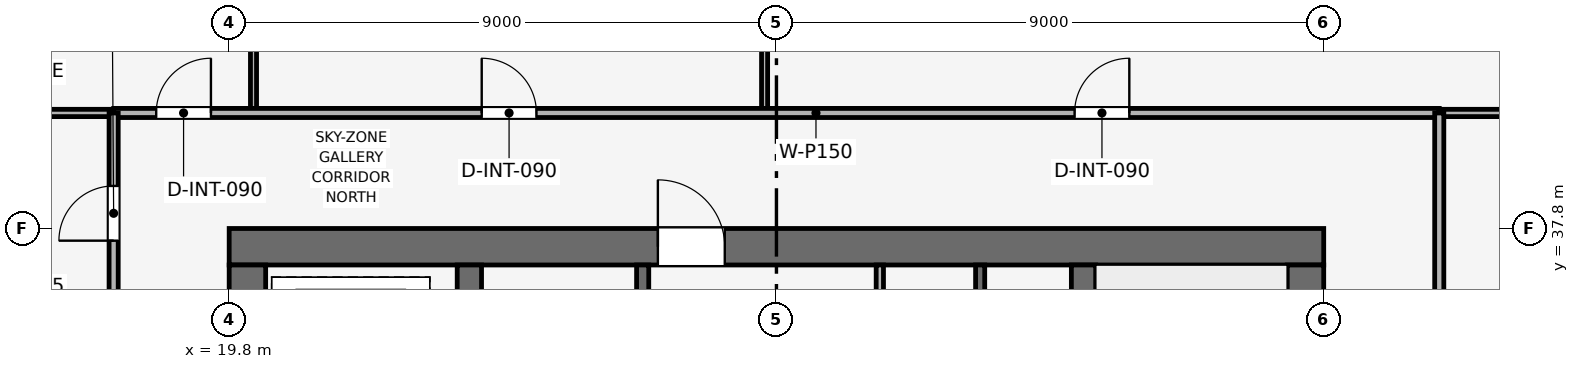
"""IFC4 building model, lengths in metres.
Left out: names, types, materials, properties, quantities, classifications, styles, units other than length and angle.
Written with IfcOpenShell. Run it as: python <this file> out.ifc"""

import sys

from ifc_helpers import new_model, si_unit, direction, frame, frame_2d, origin, place, context, subcontext, project, spatial, rectangle, extrude, element, fill, save


model = new_model("IFC4")
c1 = context("Model", 3, precision=1e-05, world=origin(), true_north=direction((0.0, 1.0)))
c2 = subcontext(c1, "Body", "Model", "MODEL_VIEW")
j1 = project(units=[si_unit("LENGTHUNIT", "METRE"), si_unit("PLANEANGLEUNIT", "RADIAN")], contexts=[c1])
p1 = place(None, origin())
s1 = spatial("IfcSite", under=j1, at=p1, CompositionType="ELEMENT")
p2 = place(p1, origin())
s2 = spatial("IfcBuilding", under=s1, at=p2, CompositionType="ELEMENT")
p3 = place(p2, frame((0.0, 0.0, 314.25)))
s3 = spatial("IfcBuildingStorey", under=s2, at=p3, CompositionType="ELEMENT", Elevation=314.25)
p4 = place(p3, frame((19.8, 37.5, 0.0), z_axis=(0.0, 0.0, 1.0), x_axis=(1.0, 0.0, 0.0)))
e1 = element("IfcWall", 1, at=p4, inside=s3, PredefinedType="SHEAR", context=c2, shape_type="SweptSolid", body=[
    extrude(rectangle(XDim=18.0, YDim=0.6, at=frame_2d((9.0, 0.0))), origin(), (0.0, 0.0, 1.0), 3.75),
])
p5 = place(p4, frame((7.05, 0.0, 0.0)))
e2 = element("IfcOpeningElement", 2, at=p5, cuts=e1, PredefinedType="OPENING", context=c2, shape_type="SweptSolid", body=[
    extrude(rectangle(XDim=1.1, YDim=2.15, at=frame_2d((0.55, 1.075))), frame((0.0, 0.31, 0.0), z_axis=(0.0, -1.0, 0.0), x_axis=(1.0, 0.0, 0.0)), (0.0, 0.0, 1.0), 0.62),
])
p6 = place(p3, frame((20.1, 20.4, 0.0), z_axis=(0.0, 0.0, 1.0), x_axis=(0.0, 1.0, 0.0)))
e3 = element("IfcWall", 3, at=p6, inside=s3, PredefinedType="SHEAR", context=c2, shape_type="SweptSolid", body=[
    extrude(rectangle(XDim=16.8, YDim=0.6, at=frame_2d((8.4, 0.0))), origin(), (0.0, 0.0, 1.0), 3.75),
])
p7 = place(p6, frame((10.4, 0.0, 0.0)))
e4 = element("IfcOpeningElement", 4, at=p7, cuts=e3, PredefinedType="OPENING", context=c2, shape_type="SweptSolid", body=[
    extrude(rectangle(XDim=1.1, YDim=2.15, at=frame_2d((0.55, 1.075))), frame((0.0, 0.31, 0.0), z_axis=(0.0, -1.0, 0.0), x_axis=(1.0, 0.0, 0.0)), (0.0, 0.0, 1.0), 0.62),
])
p8 = place(p3, frame((37.5, 20.4, 0.0), z_axis=(0.0, 0.0, 1.0), x_axis=(0.0, 1.0, 0.0)))
e5 = element("IfcWall", 5, at=p8, inside=s3, PredefinedType="SHEAR", context=c2, shape_type="SweptSolid", body=[
    extrude(rectangle(XDim=16.8, YDim=0.6, at=frame_2d((8.4, 0.0))), origin(), (0.0, 0.0, 1.0), 3.75),
])
p9 = place(p8, frame((4.9, 0.0, 0.0)))
e6 = element("IfcOpeningElement", 6, at=p9, cuts=e5, PredefinedType="OPENING", context=c2, shape_type="SweptSolid", body=[
    extrude(rectangle(XDim=1.1, YDim=2.15, at=frame_2d((0.55, 1.075))), frame((0.0, 0.31, 0.0), z_axis=(0.0, -1.0, 0.0), x_axis=(1.0, 0.0, 0.0)), (0.0, 0.0, 1.0), 0.62),
])
for number, where, z_axis, x_axis in (
    (7, (23.75, 20.4, 0.0), (0.0, 0.0, 1.0), (0.0, 1.0, 0.0)),
    (8, (33.85, 20.4, 0.0), (0.0, 0.0, 1.0), (0.0, 1.0, 0.0)),
):
    element("IfcWall", number, at=place(p3, frame(where, z_axis=z_axis, x_axis=x_axis)), inside=s3, PredefinedType="SHEAR", context=c2, shape_type="SweptSolid", body=[
        extrude(rectangle(XDim=16.8, YDim=0.4, at=frame_2d((8.4, 0.0))), origin(), (0.0, 0.0, 1.0), 3.75),
    ])
p10 = place(p3, frame((32.15, 34.0, 0.0), z_axis=(0.0, 0.0, 1.0), x_axis=(0.0, 1.0, 0.0)))
e9 = element("IfcWall", 9, at=p10, inside=s3, PredefinedType="SHEAR", context=c2, shape_type="SweptSolid", body=[
    extrude(rectangle(XDim=3.2, YDim=0.15, at=frame_2d((1.6, 0.0))), origin(), (0.0, 0.0, 1.0), 3.51),
])
p11 = place(p3, frame((26.6, 34.0, 0.0), z_axis=(0.0, 0.0, 1.0), x_axis=(0.0, 1.0, 0.0)))
e10 = element("IfcWall", 10, at=p11, inside=s3, PredefinedType="SHEAR", context=c2, shape_type="SweptSolid", body=[
    extrude(rectangle(XDim=3.2, YDim=0.2, at=frame_2d((1.6, 0.0))), origin(), (0.0, 0.0, 1.0), 3.51),
])
p12 = place(p11, frame((0.75, 0.0, 0.0)))
e11 = element("IfcOpeningElement", 11, at=p12, cuts=e10, PredefinedType="OPENING", context=c2, shape_type="SweptSolid", body=[
    extrude(rectangle(XDim=1.1, YDim=2.15, at=frame_2d((0.55, 1.075))), frame((0.0, 0.11, 0.0), z_axis=(0.0, -1.0, 0.0), x_axis=(1.0, 0.0, 0.0)), (0.0, 0.0, 1.0), 0.22),
])
p13 = place(p3, frame((30.5, 33.925, 0.0), z_axis=(0.0, 0.0, 1.0), x_axis=(0.0, 1.0, 0.0)))
e12 = element("IfcWall", 12, at=p13, inside=s3, PredefinedType="PARTITIONING", context=c2, shape_type="SweptSolid", body=[
    extrude(rectangle(XDim=3.275, YDim=0.12, at=frame_2d((1.637, 0.0))), origin(), (0.0, 0.0, 1.0), 3.51),
])
p14 = place(p13, frame((0.85, 0.0, 0.0)))
e13 = element("IfcOpeningElement", 13, at=p14, cuts=e12, PredefinedType="OPENING", context=c2, shape_type="SweptSolid", body=[
    extrude(rectangle(XDim=0.9, YDim=2.1, at=frame_2d((0.45, 1.05))), frame((0.0, 0.07, 0.0), z_axis=(0.0, -1.0, 0.0), x_axis=(1.0, 0.0, 0.0)), (0.0, 0.0, 1.0), 0.14),
])
p15 = place(p3, frame((20.2, 39.7, 0.0), z_axis=(0.0, 0.0, 1.0), x_axis=(0.0, 1.0, 0.0)))
e14 = element("IfcWall", 14, at=p15, inside=s3, PredefinedType="MOVABLE", context=c2, shape_type="SweptSolid", body=[
    extrude(rectangle(XDim=11.77, YDim=0.1, at=frame_2d((5.885, 0.0))), origin(), (0.0, 0.0, 1.0), 3.095),
])
p16 = place(p3, frame((28.605, 39.7, 0.0), z_axis=(0.0, 0.0, 1.0), x_axis=(0.0, 1.0, 0.0)))
e15 = element("IfcWall", 15, at=p16, inside=s3, PredefinedType="MOVABLE", context=c2, shape_type="SweptSolid", body=[
    extrude(rectangle(XDim=11.77, YDim=0.1, at=frame_2d((5.885, 0.0))), origin(), (0.0, 0.0, 1.0), 2.995),
])
for number, where, z_axis, x_axis in (
    (16, (6.13, 39.7, 0.0), (0.0, 0.0, 1.0), (1.0, 0.0, 0.0)),
    (17, (39.7, 39.7, 0.0), (0.0, 0.0, 1.0), (1.0, 0.0, 0.0)),
):
    element("IfcWall", number, at=place(p3, frame(where, z_axis=z_axis, x_axis=x_axis)), inside=s3, PredefinedType="PARTITIONING", context=c2, shape_type="SweptSolid", body=[
        extrude(rectangle(XDim=11.77, YDim=0.12, at=frame_2d((5.885, 0.0))), origin(), (0.0, 0.0, 1.0), 3.095),
    ])
p17 = place(p3, frame((17.9, 39.7, 0.0), z_axis=(0.0, 0.0, 1.0), x_axis=(1.0, 0.0, 0.0)))
e18 = element("IfcWall", 18, at=p17, inside=s3, PredefinedType="PARTITIONING", context=c2, shape_type="SweptSolid", body=[
    extrude(rectangle(XDim=21.8, YDim=0.15, at=frame_2d((10.9, 0.0))), origin(), (0.0, 0.0, 1.0), 3.095),
])
p18 = place(p17, frame((0.7, 0.0, 0.0)))
e19 = element("IfcOpeningElement", 19, at=p18, cuts=e18, PredefinedType="OPENING", context=c2, shape_type="SweptSolid", body=[
    extrude(rectangle(XDim=0.9, YDim=2.1, at=frame_2d((0.45, 1.05))), frame((0.0, 0.085, 0.0), z_axis=(0.0, -1.0, 0.0), x_axis=(1.0, 0.0, 0.0)), (0.0, 0.0, 1.0), 0.17),
])
p19 = place(p17, frame((6.053, 0.0, 0.0)))
e20 = element("IfcOpeningElement", 20, at=p19, cuts=e18, PredefinedType="OPENING", context=c2, shape_type="SweptSolid", body=[
    extrude(rectangle(XDim=0.9, YDim=2.1, at=frame_2d((0.45, 1.05))), frame((0.0, 0.085, 0.0), z_axis=(0.0, -1.0, 0.0), x_axis=(1.0, 0.0, 0.0)), (0.0, 0.0, 1.0), 0.17),
])
p20 = place(p17, frame((15.803, 0.0, 0.0)))
e21 = element("IfcOpeningElement", 21, at=p20, cuts=e18, PredefinedType="OPENING", context=c2, shape_type="SweptSolid", body=[
    extrude(rectangle(XDim=0.9, YDim=2.1, at=frame_2d((0.45, 1.05))), frame((0.0, 0.085, 0.0), z_axis=(0.0, -1.0, 0.0), x_axis=(1.0, 0.0, 0.0)), (0.0, 0.0, 1.0), 0.17),
])
p21 = place(p3, frame((17.9, 12.3, 0.0), z_axis=(0.0, 0.0, 1.0), x_axis=(0.0, 1.0, 0.0)))
e22 = element("IfcWall", 22, at=p21, inside=s3, PredefinedType="PARTITIONING", context=c2, shape_type="SweptSolid", body=[
    extrude(rectangle(XDim=27.4, YDim=0.15, at=frame_2d((13.7, 0.0))), origin(), (0.0, 0.0, 1.0), 3.095),
])
p22 = place(p21, frame((2.365, 0.0, 0.0)))
e23 = element("IfcOpeningElement", 23, at=p22, cuts=e22, PredefinedType="OPENING", context=c2, shape_type="SweptSolid", body=[
    extrude(rectangle(XDim=0.9, YDim=2.1, at=frame_2d((0.45, 1.05))), frame((0.0, 0.085, 0.0), z_axis=(0.0, -1.0, 0.0), x_axis=(1.0, 0.0, 0.0)), (0.0, 0.0, 1.0), 0.17),
])
p23 = place(p21, frame((10.215, 0.0, 0.0)))
e24 = element("IfcOpeningElement", 24, at=p23, cuts=e22, PredefinedType="OPENING", context=c2, shape_type="SweptSolid", body=[
    extrude(rectangle(XDim=0.9, YDim=2.1, at=frame_2d((0.45, 1.05))), frame((0.0, 0.085, 0.0), z_axis=(0.0, -1.0, 0.0), x_axis=(1.0, 0.0, 0.0)), (0.0, 0.0, 1.0), 0.17),
])
p24 = place(p21, frame((16.65, 0.0, 0.0)))
e25 = element("IfcOpeningElement", 25, at=p24, cuts=e22, PredefinedType="OPENING", context=c2, shape_type="SweptSolid", body=[
    extrude(rectangle(XDim=0.9, YDim=2.1, at=frame_2d((0.45, 1.05))), frame((0.0, 0.085, 0.0), z_axis=(0.0, -1.0, 0.0), x_axis=(1.0, 0.0, 0.0)), (0.0, 0.0, 1.0), 0.17),
])
p25 = place(p21, frame((19.55, 0.0, 0.0)))
e26 = element("IfcOpeningElement", 26, at=p25, cuts=e22, PredefinedType="OPENING", context=c2, shape_type="SweptSolid", body=[
    extrude(rectangle(XDim=0.9, YDim=2.1, at=frame_2d((0.45, 1.05))), frame((0.0, 0.085, 0.0), z_axis=(0.0, -1.0, 0.0), x_axis=(1.0, 0.0, 0.0)), (0.0, 0.0, 1.0), 0.17),
])
p26 = place(p21, frame((22.3, 0.0, 0.0)))
e27 = element("IfcOpeningElement", 27, at=p26, cuts=e22, PredefinedType="OPENING", context=c2, shape_type="SweptSolid", body=[
    extrude(rectangle(XDim=0.95, YDim=2.1, at=frame_2d((0.475, 1.05))), frame((0.0, 0.085, 0.0), z_axis=(0.0, -1.0, 0.0), x_axis=(1.0, 0.0, 0.0)), (0.0, 0.0, 1.0), 0.17),
])
p27 = place(p21, frame((25.3, 0.0, 0.0)))
e28 = element("IfcOpeningElement", 28, at=p27, cuts=e22, PredefinedType="OPENING", context=c2, shape_type="SweptSolid", body=[
    extrude(rectangle(XDim=0.9, YDim=2.1, at=frame_2d((0.45, 1.05))), frame((0.0, 0.085, 0.0), z_axis=(0.0, -1.0, 0.0), x_axis=(1.0, 0.0, 0.0)), (0.0, 0.0, 1.0), 0.17),
])
p28 = place(p3, frame((39.7, 24.4, 0.0), z_axis=(0.0, 0.0, 1.0), x_axis=(0.0, 1.0, 0.0)))
e29 = element("IfcWall", 29, at=p28, inside=s3, PredefinedType="PARTITIONING", context=c2, shape_type="SweptSolid", body=[
    extrude(rectangle(XDim=15.3, YDim=0.15, at=frame_2d((7.65, 0.0))), origin(), (0.0, 0.0, 1.0), 3.095),
])
p29 = place(p28, frame((7.2, 0.0, 0.0)))
e30 = element("IfcOpeningElement", 30, at=p29, cuts=e29, PredefinedType="OPENING", context=c2, shape_type="SweptSolid", body=[
    extrude(rectangle(XDim=0.9, YDim=2.1, at=frame_2d((0.45, 1.05))), frame((0.0, 0.085, 0.0), z_axis=(0.0, -1.0, 0.0), x_axis=(1.0, 0.0, 0.0)), (0.0, 0.0, 1.0), 0.17),
])
p30 = place(p18, origin())
e31 = element("IfcDoor", 31, at=p30, inside=s3, OperationType="SINGLE_SWING_RIGHT", PredefinedType="DOOR", context=c2, shape_type="SweptSolid", body=[
    extrude(rectangle(XDim=0.9, YDim=2.1, at=frame_2d((0.45, 1.05))), frame((0.0, 0.025, 0.0), z_axis=(0.0, -1.0, 0.0), x_axis=(1.0, 0.0, 0.0)), (0.0, 0.0, 1.0), 0.05),
])
fill(e19, e31)
p31 = place(p19, origin())
e32 = element("IfcDoor", 32, at=p31, inside=s3, OperationType="SINGLE_SWING_LEFT", PredefinedType="DOOR", context=c2, shape_type="SweptSolid", body=[
    extrude(rectangle(XDim=0.9, YDim=2.1, at=frame_2d((0.45, 1.05))), frame((0.0, 0.025, 0.0), z_axis=(0.0, -1.0, 0.0), x_axis=(1.0, 0.0, 0.0)), (0.0, 0.0, 1.0), 0.05),
])
fill(e20, e32)
p32 = place(p20, origin())
e33 = element("IfcDoor", 33, at=p32, inside=s3, OperationType="SINGLE_SWING_RIGHT", PredefinedType="DOOR", context=c2, shape_type="SweptSolid", body=[
    extrude(rectangle(XDim=0.9, YDim=2.1, at=frame_2d((0.45, 1.05))), frame((0.0, 0.025, 0.0), z_axis=(0.0, -1.0, 0.0), x_axis=(1.0, 0.0, 0.0)), (0.0, 0.0, 1.0), 0.05),
])
fill(e21, e33)
p33 = place(p27, origin())
e34 = element("IfcDoor", 34, at=p33, inside=s3, OperationType="SINGLE_SWING_LEFT", PredefinedType="DOOR", context=c2, shape_type="SweptSolid", body=[
    extrude(rectangle(XDim=0.9, YDim=2.1, at=frame_2d((0.45, 1.05))), frame((0.0, 0.025, 0.0), z_axis=(0.0, -1.0, 0.0), x_axis=(1.0, 0.0, 0.0)), (0.0, 0.0, 1.0), 0.05),
])
fill(e28, e34)
p34 = place(p5, origin())
e35 = element("IfcDoor", 35, at=p34, inside=s3, OperationType="SINGLE_SWING_LEFT", PredefinedType="DOOR", context=c2, shape_type="SweptSolid", body=[
    extrude(rectangle(XDim=1.1, YDim=2.15, at=frame_2d((0.55, 1.075))), frame((0.0, 0.025, 0.0), z_axis=(0.0, -1.0, 0.0), x_axis=(1.0, 0.0, 0.0)), (0.0, 0.0, 1.0), 0.05),
])
fill(e2, e35)
save(model, sys.argv[1])
